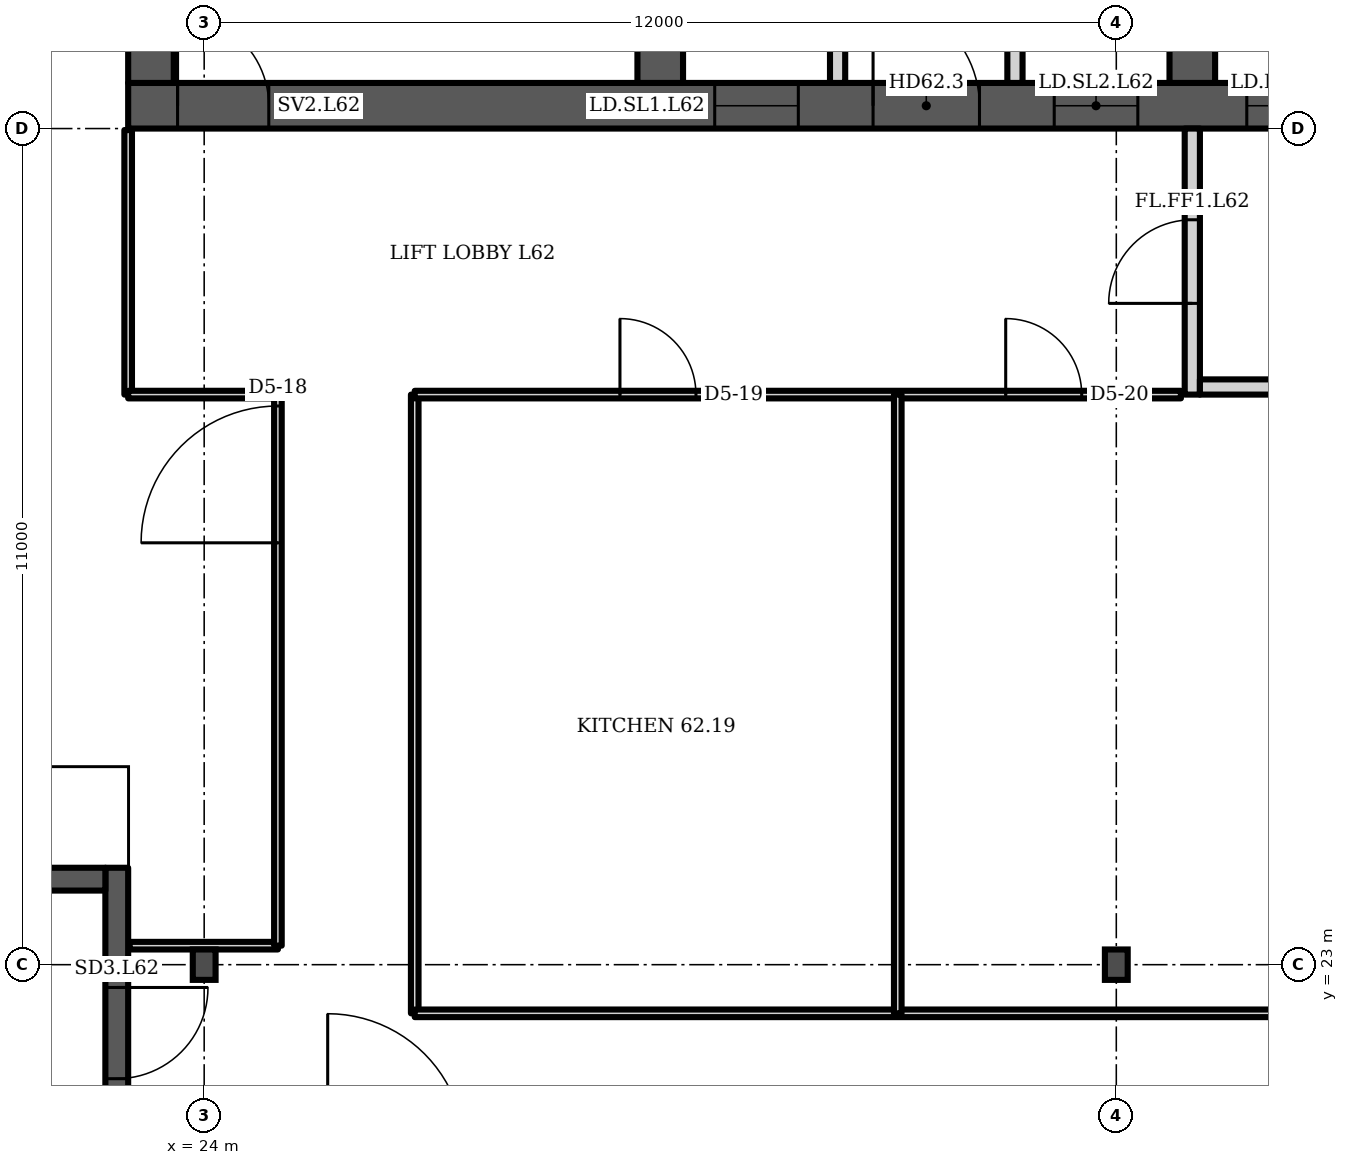
"""IFC4 building model, lengths in metres.
Left out: names, types, materials, properties, quantities, classifications, styles, units other than length and angle.
Written with IfcOpenShell. Run it as: python <this file> out.ifc"""

import sys

from ifc_helpers import new_model, si_unit, direction, frame, frame_2d, origin, origin_2d, place, context, subcontext, project, spatial, polyline, rectangle, i_section, outline, extrude, element, fill, save


model = new_model("IFC4")
c1 = context("Model", 3, precision=1e-05, world=origin(), true_north=direction((0.0, 1.0)))
c2 = subcontext(c1, "Body", "Model", "MODEL_VIEW")
j1 = project(units=[si_unit("LENGTHUNIT", "METRE"), si_unit("PLANEANGLEUNIT", "RADIAN")], contexts=[c1])
p1 = place(None, origin())
s1 = spatial("IfcSite", under=j1, at=p1, CompositionType="ELEMENT")
p2 = place(p1, origin())
s2 = spatial("IfcBuilding", under=s1, at=p2, CompositionType="ELEMENT")
p3 = place(p2, frame((0.0, 0.0, 246.7)))
s3 = spatial("IfcBuildingStorey", under=s2, at=p3, CompositionType="ELEMENT", Elevation=246.7)
p4 = place(p3, frame((23.0, 34.3, 0.0), z_axis=(0.0, 0.0, 1.0), x_axis=(1.0, 0.0, 0.0)))
e1 = element("IfcWall", 1, at=p4, inside=s3, PredefinedType="SHEAR", context=c2, shape_type="SweptSolid", body=[
    extrude(rectangle(XDim=35.0, YDim=0.6, at=frame_2d((17.5, 0.0))), origin(), (0.0, 0.0, 1.0), 3.6),
])
p5 = place(p4, frame((0.65, 0.0, 0.0)))
e2 = element("IfcOpeningElement", 2, at=p5, cuts=e1, PredefinedType="OPENING", context=c2, shape_type="SweptSolid", body=[
    extrude(rectangle(XDim=1.2, YDim=2.1, at=frame_2d((0.6, 1.05))), frame((0.0, 0.31, 0.0), z_axis=(0.0, -1.0, 0.0), x_axis=(1.0, 0.0, 0.0)), (0.0, 0.0, 1.0), 0.62),
])
p6 = place(p4, frame((7.717, 0.0, 0.0)))
e3 = element("IfcOpeningElement", 3, at=p6, cuts=e1, PredefinedType="OPENING", context=c2, shape_type="SweptSolid", body=[
    extrude(rectangle(XDim=1.1, YDim=2.1, at=frame_2d((0.55, 1.05))), frame((0.0, 0.31, 0.0), z_axis=(0.0, -1.0, 0.0), x_axis=(1.0, 0.0, 0.0)), (0.0, 0.0, 1.0), 0.62),
])
p7 = place(p4, frame((12.183, 0.0, 0.0)))
e4 = element("IfcOpeningElement", 4, at=p7, cuts=e1, PredefinedType="OPENING", context=c2, shape_type="SweptSolid", body=[
    extrude(rectangle(XDim=1.1, YDim=2.1, at=frame_2d((0.55, 1.05))), frame((0.0, 0.31, 0.0), z_axis=(0.0, -1.0, 0.0), x_axis=(1.0, 0.0, 0.0)), (0.0, 0.0, 1.0), 0.62),
])
p8 = place(p4, frame((9.8, 0.0, 0.0)))
e5 = element("IfcOpeningElement", 5, at=p8, cuts=e1, PredefinedType="OPENING", context=c2, shape_type="SweptSolid", body=[
    extrude(rectangle(XDim=1.4, YDim=2.1, at=frame_2d((0.7, 1.05))), frame((0.0, 0.31, 0.0), z_axis=(0.0, -1.0, 0.0), x_axis=(1.0, 0.0, 0.0)), (0.0, 0.0, 1.0), 0.62),
])
p9 = place(p4, frame((14.717, 0.0, 0.0)))
e6 = element("IfcOpeningElement", 6, at=p9, cuts=e1, PredefinedType="OPENING", context=c2, shape_type="SweptSolid", body=[
    extrude(rectangle(XDim=1.1, YDim=2.1, at=frame_2d((0.55, 1.05))), frame((0.0, 0.31, 0.0), z_axis=(0.0, -1.0, 0.0), x_axis=(1.0, 0.0, 0.0)), (0.0, 0.0, 1.0), 0.62),
])
p10 = place(p4, frame((16.95, 0.0, 0.0)))
e7 = element("IfcOpeningElement", 7, at=p10, cuts=e1, PredefinedType="OPENING", context=c2, shape_type="SweptSolid", body=[
    extrude(rectangle(XDim=1.1, YDim=2.1, at=frame_2d((0.55, 1.05))), frame((0.0, 0.31, 0.0), z_axis=(0.0, -1.0, 0.0), x_axis=(1.0, 0.0, 0.0)), (0.0, 0.0, 1.0), 0.62),
])
p11 = place(p4, frame((19.183, 0.0, 0.0)))
e8 = element("IfcOpeningElement", 8, at=p11, cuts=e1, PredefinedType="OPENING", context=c2, shape_type="SweptSolid", body=[
    extrude(rectangle(XDim=1.1, YDim=2.1, at=frame_2d((0.55, 1.05))), frame((0.0, 0.31, 0.0), z_axis=(0.0, -1.0, 0.0), x_axis=(1.0, 0.0, 0.0)), (0.0, 0.0, 1.0), 0.62),
])
p12 = place(p4, frame((26.15, 0.0, 0.0)))
e9 = element("IfcOpeningElement", 9, at=p12, cuts=e1, PredefinedType="OPENING", context=c2, shape_type="SweptSolid", body=[
    extrude(rectangle(XDim=1.2, YDim=2.1, at=frame_2d((0.6, 1.05))), frame((0.0, 0.31, 0.0), z_axis=(0.0, -1.0, 0.0), x_axis=(1.0, 0.0, 0.0)), (0.0, 0.0, 1.0), 0.62),
])
p13 = place(p4, frame((30.8, 0.0, 0.0)))
e10 = element("IfcOpeningElement", 10, at=p13, cuts=e1, PredefinedType="OPENING", context=c2, shape_type="SweptSolid", body=[
    extrude(rectangle(XDim=1.4, YDim=2.1, at=frame_2d((0.7, 1.05))), frame((0.0, 0.31, 0.0), z_axis=(0.0, -1.0, 0.0), x_axis=(1.0, 0.0, 0.0)), (0.0, 0.0, 1.0), 0.62),
])
p14 = place(p3, frame((23.3, 34.6, 0.0), z_axis=(0.0, 0.0, 1.0), x_axis=(0.0, 1.0, 0.0)))
e11 = element("IfcWall", 11, at=p14, inside=s3, PredefinedType="SHEAR", context=c2, shape_type="SweptSolid", body=[
    extrude(rectangle(XDim=13.585, YDim=0.6, at=frame_2d((6.792, 0.0))), origin(), (0.0, 0.0, 1.0), 3.6),
])
p15 = place(p3, frame((30.0, 34.6, 0.0), z_axis=(0.0, 0.0, 1.0), x_axis=(0.0, 1.0, 0.0)))
e12 = element("IfcWall", 12, at=p15, inside=s3, PredefinedType="SHEAR", context=c2, shape_type="SweptSolid", body=[
    extrude(rectangle(XDim=14.171, YDim=0.6, at=frame_2d((7.085, 0.0))), origin(), (0.0, 0.0, 1.0), 3.6),
])
p16 = place(p15, frame((3.8, 0.0, 0.0)))
e13 = element("IfcOpeningElement", 13, at=p16, cuts=e12, PredefinedType="OPENING", context=c2, shape_type="SweptSolid", body=[
    extrude(rectangle(XDim=1.1, YDim=2.1, at=frame_2d((0.55, 1.05))), frame((0.0, 0.31, 0.0), z_axis=(0.0, -1.0, 0.0), x_axis=(1.0, 0.0, 0.0)), (0.0, 0.0, 1.0), 0.62),
])
p17 = place(p3, frame((37.0, 34.6, 0.0), z_axis=(0.0, 0.0, 1.0), x_axis=(0.0, 1.0, 0.0)))
e14 = element("IfcWall", 14, at=p17, inside=s3, PredefinedType="SHEAR", context=c2, shape_type="SweptSolid", body=[
    extrude(rectangle(XDim=14.784, YDim=0.6, at=frame_2d((7.392, 0.0))), origin(), (0.0, 0.0, 1.0), 3.6),
])
p18 = place(p17, frame((11.302, 0.0, 0.0)))
e15 = element("IfcOpeningElement", 15, at=p18, cuts=e14, PredefinedType="OPENING", context=c2, shape_type="SweptSolid", body=[
    extrude(rectangle(XDim=1.0, YDim=2.1, at=frame_2d((0.5, 1.05))), frame((0.0, 0.31, 0.0), z_axis=(0.0, -1.0, 0.0), x_axis=(1.0, 0.0, 0.0)), (0.0, 0.0, 1.0), 0.62),
])
p19 = place(p17, frame((3.8, 0.0, 0.0)))
e16 = element("IfcOpeningElement", 16, at=p19, cuts=e14, PredefinedType="OPENING", context=c2, shape_type="SweptSolid", body=[
    extrude(rectangle(XDim=1.1, YDim=2.1, at=frame_2d((0.55, 1.05))), frame((0.0, 0.31, 0.0), z_axis=(0.0, -1.0, 0.0), x_axis=(1.0, 0.0, 0.0)), (0.0, 0.0, 1.0), 0.62),
])
for number, where, z_axis, x_axis in (
    (17, (24.0, 23.0, 0.0), (0.0, 0.0, 1.0), (1.0, 0.0, 0.0)),
    (18, (36.0, 23.0, 0.0), (0.0, 0.0, 1.0), (1.0, 0.0, 0.0)),
):
    element("IfcColumn", number, at=place(p3, frame(where, z_axis=z_axis, x_axis=x_axis)), inside=s3, PredefinedType="COLUMN", context=c2, shape_type="SweptSolid", body=[
        extrude(i_section(OverallWidth=0.3, OverallDepth=0.4, WebThickness=0.013, FlangeThickness=0.024, FilletRadius=0.027, at=origin_2d()), origin(), (0.0, 0.0, 1.0), 3.6),
    ])
p20 = place(p3, frame((0.0, 0.0, -0.0)))
e19 = element("IfcWall", 19, at=p20, inside=s3, PredefinedType="PARTITIONING", context=c2, shape_type="SweptSolid", body=[
    extrude(outline(polyline([(32.233, 37.45), (30.3, 37.45), (30.3, 37.65), (32.233, 37.65), (32.433, 37.65), (32.433, 34.6), (32.233, 34.6), (32.233, 37.45)])), origin(), (0.0, 0.0, 1.0), 3.2),
])
p21 = place(p3, frame((0.0, 0.0, -0.0)))
e20 = element("IfcWall", 20, at=p21, inside=s3, PredefinedType="PARTITIONING", context=c2, shape_type="SweptSolid", body=[
    extrude(outline(polyline([(34.567, 37.65), (34.767, 37.65), (36.7, 37.65), (36.7, 37.45), (34.767, 37.45), (34.767, 34.6), (34.567, 34.6), (34.567, 37.65)])), origin(), (0.0, 0.0, 1.0), 3.2),
])
p22 = place(p3, frame((0.0, 0.0, -0.0)))
e21 = element("IfcWall", 21, at=p22, inside=s3, PredefinedType="PARTITIONING", context=c2, shape_type="SweptSolid", body=[
    extrude(outline(polyline([(41.567, 37.1), (39.433, 37.1), (39.433, 34.6), (39.233, 34.6), (39.233, 37.45), (37.3, 37.45), (37.3, 37.65), (39.233, 37.65), (39.433, 37.65), (39.433, 37.3), (41.567, 37.3), (41.567, 37.35), (41.767, 37.35), (43.7, 37.35), (43.7, 37.15), (41.767, 37.15), (41.767, 34.6), (41.567, 34.6), (41.567, 37.1)])), origin(), (0.0, 0.0, 1.0), 3.2),
])
p23 = place(p3, frame((37.0, 30.5, 0.0), z_axis=(0.0, 0.0, 1.0), x_axis=(0.0, 1.0, 0.0)))
e22 = element("IfcWall", 22, at=p23, inside=s3, PredefinedType="PARTITIONING", context=c2, shape_type="SweptSolid", body=[
    extrude(rectangle(XDim=3.5, YDim=0.2, at=frame_2d((1.75, 0.0))), origin(), (0.0, 0.0, 1.0), 3.2),
])
p24 = place(p23, frame((1.2, 0.0, 0.0)))
e23 = element("IfcOpeningElement", 23, at=p24, cuts=e22, PredefinedType="OPENING", context=c2, shape_type="SweptSolid", body=[
    extrude(rectangle(XDim=1.1, YDim=2.1, at=frame_2d((0.55, 1.05))), frame((0.0, 0.11, 0.0), z_axis=(0.0, -1.0, 0.0), x_axis=(1.0, 0.0, 0.0)), (0.0, 0.0, 1.0), 0.22),
])
p25 = place(p3, frame((37.1, 30.6, 0.0), z_axis=(0.0, 0.0, 1.0), x_axis=(1.0, 0.0, 0.0)))
e24 = element("IfcWall", 24, at=p25, inside=s3, PredefinedType="PARTITIONING", context=c2, shape_type="SweptSolid", body=[
    extrude(rectangle(XDim=2.8, YDim=0.2, at=frame_2d((1.4, 0.0))), origin(), (0.0, 0.0, 1.0), 3.2),
])
p26 = place(p3, frame((22.85, 19.925, 0.0), z_axis=(0.0, 0.0, 1.0), x_axis=(0.0, 1.0, 0.0)))
e25 = element("IfcWall", 25, at=p26, inside=s3, PredefinedType="SHEAR", context=c2, shape_type="SweptSolid", body=[
    extrude(rectangle(XDim=4.35, YDim=0.3, at=frame_2d((2.175, 0.0))), origin(), (0.0, 0.0, 1.0), 3.2),
])
p27 = place(p26, frame((1.575, 0.0, 0.0)))
e26 = element("IfcOpeningElement", 26, at=p27, cuts=e25, PredefinedType="OPENING", context=c2, shape_type="SweptSolid", body=[
    extrude(rectangle(XDim=1.2, YDim=2.1, at=frame_2d((0.6, 1.05))), frame((0.0, 0.16, 0.0), z_axis=(0.0, -1.0, 0.0), x_axis=(1.0, 0.0, 0.0)), (0.0, 0.0, 1.0), 0.32),
])
p28 = place(p3, frame((23.0, 30.5, 0.0), z_axis=(0.0, 0.0, 1.0), x_axis=(0.0, 1.0, 0.0)))
e27 = element("IfcWall", 27, at=p28, inside=s3, PredefinedType="PARTITIONING", context=c2, shape_type="SweptSolid", body=[
    extrude(rectangle(XDim=3.48, YDim=0.1, at=frame_2d((1.74, 0.0))), origin(), (0.0, 0.0, 1.0), 3.2),
])
p29 = place(p3, frame((23.0, 30.5, 0.0), z_axis=(0.0, 0.0, 1.0), x_axis=(1.0, 0.0, 0.0)))
e28 = element("IfcWall", 28, at=p29, inside=s3, PredefinedType="PARTITIONING", context=c2, shape_type="SweptSolid", body=[
    extrude(rectangle(XDim=1.97, YDim=0.1, at=frame_2d((0.985, 0.0))), origin(), (0.0, 0.0, 1.0), 3.2),
])
p30 = place(p3, frame((23.02, 23.25, 0.0), z_axis=(0.0, 0.0, 1.0), x_axis=(1.0, 0.0, 0.0)))
e29 = element("IfcWall", 29, at=p30, inside=s3, PredefinedType="PARTITIONING", context=c2, shape_type="SweptSolid", body=[
    extrude(rectangle(XDim=1.95, YDim=0.1, at=frame_2d((0.975, 0.0))), origin(), (0.0, 0.0, 1.0), 3.2),
])
p31 = place(p3, frame((24.97, 23.25, 0.0), z_axis=(0.0, 0.0, 1.0), x_axis=(0.0, 1.0, 0.0)))
e30 = element("IfcWall", 30, at=p31, inside=s3, PredefinedType="PARTITIONING", context=c2, shape_type="SweptSolid", body=[
    extrude(rectangle(XDim=7.25, YDim=0.1, at=frame_2d((3.625, 0.0))), origin(), (0.0, 0.0, 1.0), 3.2),
])
p32 = place(p31, frame((5.3, 0.0, 0.0)))
e31 = element("IfcOpeningElement", 31, at=p32, cuts=e30, PredefinedType="OPENING", context=c2, shape_type="SweptSolid", body=[
    extrude(rectangle(XDim=1.8, YDim=2.1, at=frame_2d((0.9, 1.05))), frame((0.0, 0.06, 0.0), z_axis=(0.0, -1.0, 0.0), x_axis=(1.0, 0.0, 0.0)), (0.0, 0.0, 1.0), 0.12),
])
p33 = place(p3, frame((26.77, 22.36, 0.0), z_axis=(0.0, 0.0, 1.0), x_axis=(0.0, 1.0, 0.0)))
e32 = element("IfcWall", 32, at=p33, inside=s3, PredefinedType="PARTITIONING", context=c2, shape_type="SweptSolid", body=[
    extrude(rectangle(XDim=8.14, YDim=0.1, at=frame_2d((4.07, 0.0))), origin(), (0.0, 0.0, 1.0), 3.2),
])
p34 = place(p3, frame((26.77, 22.36, 0.0), z_axis=(0.0, 0.0, 1.0), x_axis=(1.0, 0.0, 0.0)))
e33 = element("IfcWall", 33, at=p34, inside=s3, PredefinedType="PARTITIONING", context=c2, shape_type="SweptSolid", body=[
    extrude(rectangle(XDim=38.3, YDim=0.1, at=frame_2d((19.15, 0.0))), origin(), (0.0, 0.0, 1.0), 3.2),
])
p35 = place(p3, frame((26.77, 30.5, 0.0), z_axis=(0.0, 0.0, 1.0), x_axis=(1.0, 0.0, 0.0)))
e34 = element("IfcWall", 34, at=p35, inside=s3, PredefinedType="PARTITIONING", context=c2, shape_type="SweptSolid", body=[
    extrude(rectangle(XDim=10.08, YDim=0.1, at=frame_2d((5.04, 0.0))), origin(), (0.0, 0.0, 1.0), 3.2),
])
p36 = place(p35, frame((2.7, 0.0, 0.0)))
e35 = element("IfcOpeningElement", 35, at=p36, cuts=e34, PredefinedType="OPENING", context=c2, shape_type="SweptSolid", body=[
    extrude(rectangle(XDim=1.0, YDim=2.1, at=frame_2d((0.5, 1.05))), frame((0.0, 0.06, 0.0), z_axis=(0.0, -1.0, 0.0), x_axis=(1.0, 0.0, 0.0)), (0.0, 0.0, 1.0), 0.12),
])
p37 = place(p35, frame((7.775, 0.0, 0.0)))
e36 = element("IfcOpeningElement", 36, at=p37, cuts=e34, PredefinedType="OPENING", context=c2, shape_type="SweptSolid", body=[
    extrude(rectangle(XDim=1.0, YDim=2.1, at=frame_2d((0.5, 1.05))), frame((0.0, 0.06, 0.0), z_axis=(0.0, -1.0, 0.0), x_axis=(1.0, 0.0, 0.0)), (0.0, 0.0, 1.0), 0.12),
])
p38 = place(p3, frame((33.125, 22.36, 0.0), z_axis=(0.0, 0.0, 1.0), x_axis=(0.0, 1.0, 0.0)))
e37 = element("IfcWall", 37, at=p38, inside=s3, PredefinedType="PARTITIONING", context=c2, shape_type="SweptSolid", body=[
    extrude(rectangle(XDim=8.14, YDim=0.1, at=frame_2d((4.07, 0.0))), origin(), (0.0, 0.0, 1.0), 3.2),
])
p39 = place(p3, frame((15.2, 24.125, 0.0), z_axis=(0.0, 0.0, 1.0), x_axis=(1.0, 0.0, 0.0)))
e38 = element("IfcWall", 38, at=p39, inside=s3, PredefinedType="SHEAR", context=c2, shape_type="SweptSolid", body=[
    extrude(rectangle(XDim=7.5, YDim=0.3, at=frame_2d((3.75, 0.0))), origin(), (0.0, 0.0, 1.0), 3.2),
])
p40 = place(p5, origin())
e39 = element("IfcDoor", 39, at=p40, inside=s3, OperationType="SINGLE_SWING_LEFT", PredefinedType="DOOR", context=c2, shape_type="SweptSolid", body=[
    extrude(rectangle(XDim=1.2, YDim=2.1, at=frame_2d((0.6, 1.05))), frame((0.0, 0.025, 0.0), z_axis=(0.0, -1.0, 0.0), x_axis=(1.0, 0.0, 0.0)), (0.0, 0.0, 1.0), 0.05),
])
fill(e2, e39)
p41 = place(p6, origin())
e40 = element("IfcDoor", 40, at=p41, inside=s3, OperationType="DOUBLE_DOOR_SLIDING", PredefinedType="DOOR", context=c2, shape_type="SweptSolid", body=[
    extrude(rectangle(XDim=1.1, YDim=2.1, at=frame_2d((0.55, 1.05))), frame((0.0, 0.025, 0.0), z_axis=(0.0, -1.0, 0.0), x_axis=(1.0, 0.0, 0.0)), (0.0, 0.0, 1.0), 0.05),
])
fill(e3, e40)
p42 = place(p7, origin())
e41 = element("IfcDoor", 41, at=p42, inside=s3, OperationType="DOUBLE_DOOR_SLIDING", PredefinedType="DOOR", context=c2, shape_type="SweptSolid", body=[
    extrude(rectangle(XDim=1.1, YDim=2.1, at=frame_2d((0.55, 1.05))), frame((0.0, 0.025, 0.0), z_axis=(0.0, -1.0, 0.0), x_axis=(1.0, 0.0, 0.0)), (0.0, 0.0, 1.0), 0.05),
])
fill(e4, e41)
p43 = place(p8, origin())
e42 = element("IfcDoor", 42, at=p43, inside=s3, OperationType="DOUBLE_DOOR_SINGLE_SWING", PredefinedType="DOOR", context=c2, shape_type="SweptSolid", body=[
    extrude(rectangle(XDim=1.4, YDim=2.1, at=frame_2d((0.7, 1.05))), frame((0.0, 0.025, 0.0), z_axis=(0.0, -1.0, 0.0), x_axis=(1.0, 0.0, 0.0)), (0.0, 0.0, 1.0), 0.05),
])
fill(e5, e42)
p44 = place(p9, origin())
e43 = element("IfcDoor", 43, at=p44, inside=s3, OperationType="DOUBLE_DOOR_SLIDING", PredefinedType="DOOR", context=c2, shape_type="SweptSolid", body=[
    extrude(rectangle(XDim=1.1, YDim=2.1, at=frame_2d((0.55, 1.05))), frame((0.0, 0.025, 0.0), z_axis=(0.0, -1.0, 0.0), x_axis=(1.0, 0.0, 0.0)), (0.0, 0.0, 1.0), 0.05),
])
fill(e6, e43)
p45 = place(p24, origin())
e44 = element("IfcDoor", 44, at=p45, inside=s3, OperationType="SINGLE_SWING_LEFT", PredefinedType="DOOR", context=c2, shape_type="SweptSolid", body=[
    extrude(rectangle(XDim=1.1, YDim=2.1, at=frame_2d((0.55, 1.05))), frame((0.0, 0.025, 0.0), z_axis=(0.0, -1.0, 0.0), x_axis=(1.0, 0.0, 0.0)), (0.0, 0.0, 1.0), 0.05),
])
fill(e23, e44)
p46 = place(p27, origin())
e45 = element("IfcDoor", 45, at=p46, inside=s3, OperationType="SINGLE_SWING_RIGHT", PredefinedType="DOOR", context=c2, shape_type="SweptSolid", body=[
    extrude(rectangle(XDim=1.2, YDim=2.1, at=frame_2d((0.6, 1.05))), frame((0.0, 0.025, 0.0), z_axis=(0.0, -1.0, 0.0), x_axis=(1.0, 0.0, 0.0)), (0.0, 0.0, 1.0), 0.05),
])
fill(e26, e45)
p47 = place(p32, origin())
e46 = element("IfcDoor", 46, at=p47, inside=s3, OperationType="DOUBLE_DOOR_SINGLE_SWING", PredefinedType="DOOR", context=c2, shape_type="SweptSolid", body=[
    extrude(rectangle(XDim=1.8, YDim=2.1, at=frame_2d((0.9, 1.05))), frame((0.0, 0.025, 0.0), z_axis=(0.0, -1.0, 0.0), x_axis=(1.0, 0.0, 0.0)), (0.0, 0.0, 1.0), 0.05),
])
fill(e31, e46)
p48 = place(p36, origin())
e47 = element("IfcDoor", 47, at=p48, inside=s3, OperationType="SINGLE_SWING_LEFT", PredefinedType="DOOR", context=c2, shape_type="SweptSolid", body=[
    extrude(rectangle(XDim=1.0, YDim=2.1, at=frame_2d((0.5, 1.05))), frame((0.0, 0.025, 0.0), z_axis=(0.0, -1.0, 0.0), x_axis=(1.0, 0.0, 0.0)), (0.0, 0.0, 1.0), 0.05),
])
fill(e35, e47)
p49 = place(p37, origin())
e48 = element("IfcDoor", 48, at=p49, inside=s3, OperationType="SINGLE_SWING_LEFT", PredefinedType="DOOR", context=c2, shape_type="SweptSolid", body=[
    extrude(rectangle(XDim=1.0, YDim=2.1, at=frame_2d((0.5, 1.05))), frame((0.0, 0.025, 0.0), z_axis=(0.0, -1.0, 0.0), x_axis=(1.0, 0.0, 0.0)), (0.0, 0.0, 1.0), 0.05),
])
fill(e36, e48)
save(model, sys.argv[1])
